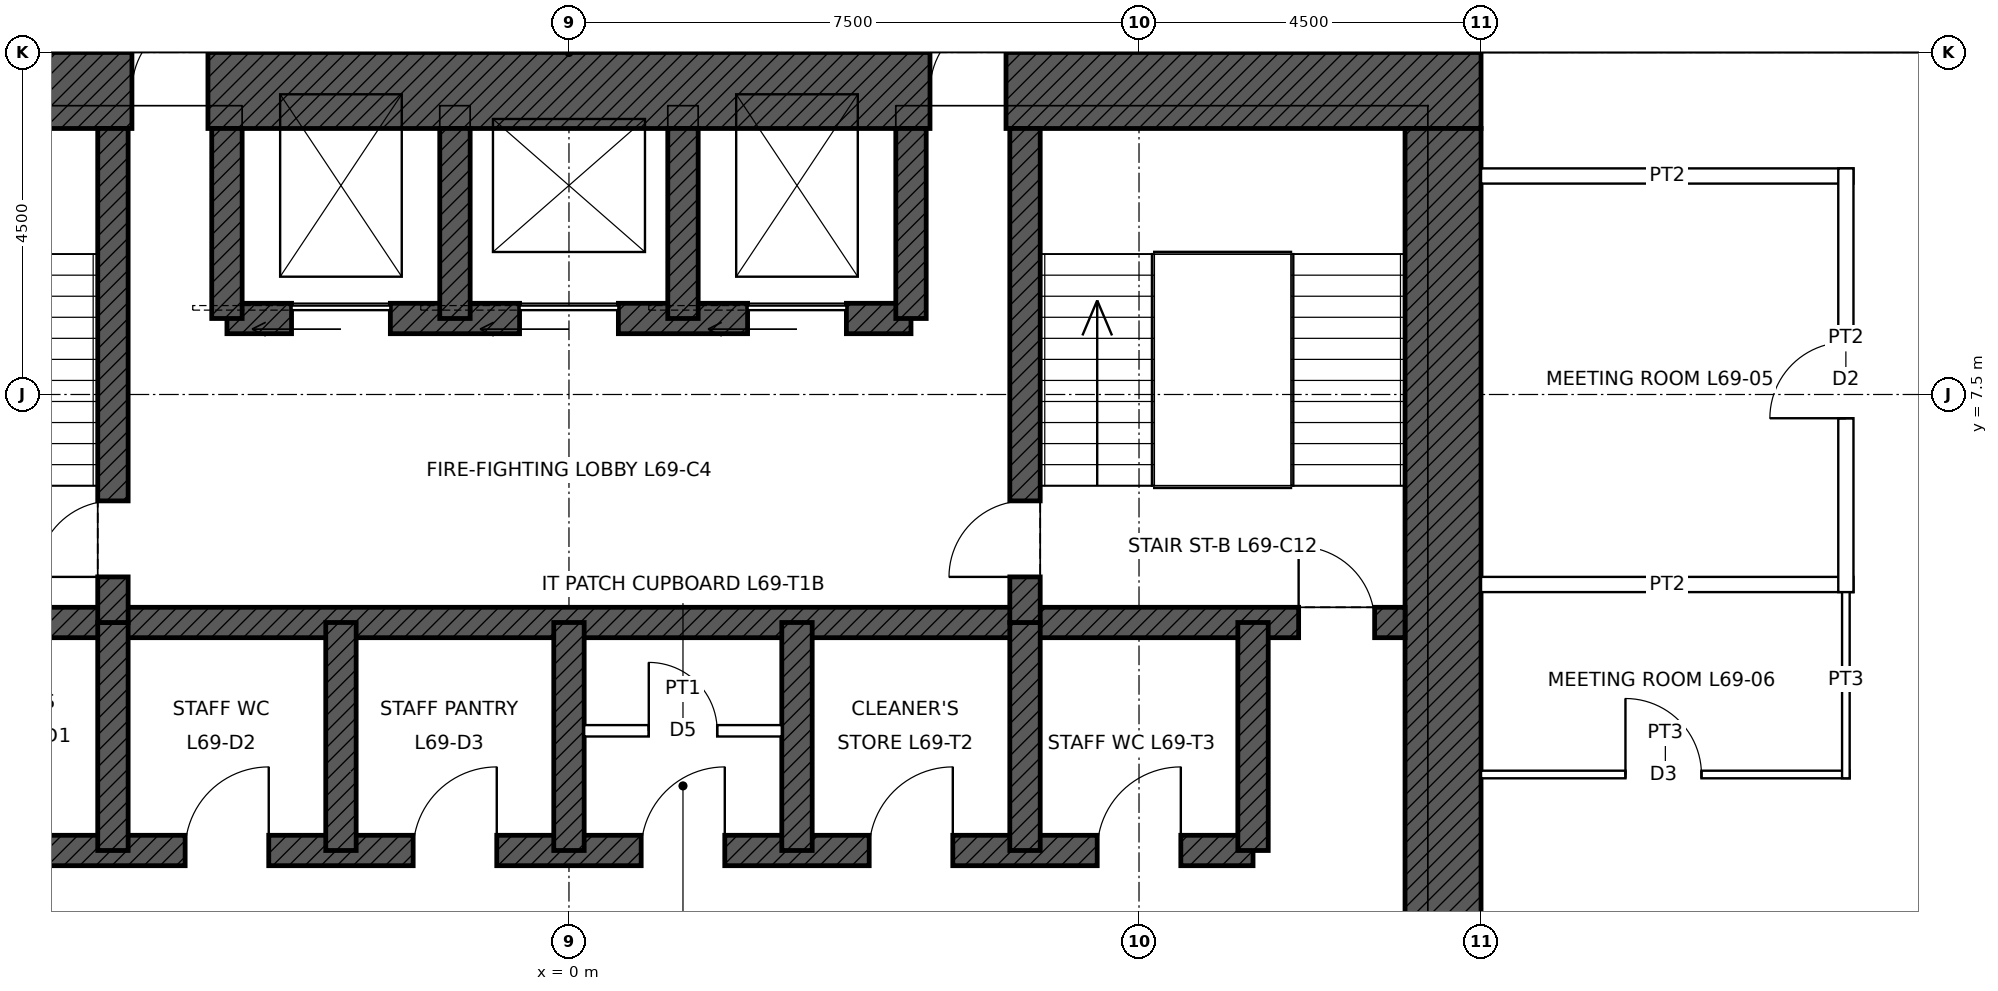
"""IFC4 building model, lengths in metres.
Left out: names, types, materials, properties, quantities, classifications, styles, units other than length and angle.
Written with IfcOpenShell. Run it as: python <this file> out.ifc"""

import sys

from ifc_helpers import new_model, si_unit, direction, frame, frame_2d, origin, place, context, subcontext, project, spatial, rectangle, extrude, element, fill, save


model = new_model("IFC4")
c1 = context("Model", 3, precision=1e-05, world=origin(), true_north=direction((0.0, 1.0)))
c2 = subcontext(c1, "Body", "Model", "MODEL_VIEW")
j1 = project(units=[si_unit("LENGTHUNIT", "METRE"), si_unit("PLANEANGLEUNIT", "RADIAN")], contexts=[c1])
p1 = place(None, origin())
s1 = spatial("IfcSite", under=j1, at=p1, CompositionType="ELEMENT")
p2 = place(p1, origin())
s2 = spatial("IfcBuilding", under=s1, at=p2, CompositionType="ELEMENT")
p3 = place(p2, frame((0.0, 0.0, 311.9)))
s3 = spatial("IfcBuildingStorey", under=s2, at=p3, CompositionType="ELEMENT", Elevation=311.9)
p4 = place(p3, frame((-12.0, 11.5, 0.0), z_axis=(0.0, 0.0, 1.0), x_axis=(1.0, 0.0, 0.0)))
e1 = element("IfcWall", 1, at=p4, inside=s3, PredefinedType="SHEAR", context=c2, shape_type="SweptSolid", body=[
    extrude(rectangle(XDim=24.0, YDim=1.0, at=frame_2d((12.0, 0.0))), origin(), (0.0, 0.0, 1.0), 4.0),
])
p5 = place(p4, frame((6.25, 0.0, 0.0)))
e2 = element("IfcOpeningElement", 2, at=p5, cuts=e1, PredefinedType="OPENING", context=c2, shape_type="SweptSolid", body=[
    extrude(rectangle(XDim=1.0, YDim=2.4, at=frame_2d((0.5, 1.2))), frame((0.0, 0.51, 0.0), z_axis=(0.0, -1.0, 0.0), x_axis=(1.0, 0.0, 0.0)), (0.0, 0.0, 1.0), 1.02),
])
p6 = place(p4, frame((16.75, 0.0, 0.0)))
e3 = element("IfcOpeningElement", 3, at=p6, cuts=e1, PredefinedType="OPENING", context=c2, shape_type="SweptSolid", body=[
    extrude(rectangle(XDim=1.0, YDim=2.4, at=frame_2d((0.5, 1.2))), frame((0.0, 0.51, 0.0), z_axis=(0.0, -1.0, 0.0), x_axis=(1.0, 0.0, 0.0)), (0.0, 0.0, 1.0), 1.02),
])
p7 = place(p3, frame((11.5, 11.0, 0.0), z_axis=(0.0, 0.0, 1.0), x_axis=(0.0, -1.0, 0.0)))
e4 = element("IfcWall", 4, at=p7, inside=s3, PredefinedType="SHEAR", context=c2, shape_type="SweptSolid", body=[
    extrude(rectangle(XDim=22.0, YDim=1.0, at=frame_2d((11.0, 0.0))), origin(), (0.0, 0.0, 1.0), 4.0),
])
p8 = place(p7, frame((10.5, 0.0, 0.0)))
e5 = element("IfcOpeningElement", 5, at=p8, cuts=e4, PredefinedType="OPENING", context=c2, shape_type="SweptSolid", body=[
    extrude(rectangle(XDim=1.0, YDim=2.4, at=frame_2d((0.5, 1.2))), frame((0.0, 0.51, 0.0), z_axis=(0.0, -1.0, 0.0), x_axis=(1.0, 0.0, 0.0)), (0.0, 0.0, 1.0), 1.02),
])
p9 = place(p3, frame((-11.0, 4.5, 0.0), z_axis=(0.0, 0.0, 1.0), x_axis=(1.0, 0.0, 0.0)))
e6 = element("IfcWall", 6, at=p9, inside=s3, PredefinedType="SHEAR", context=c2, shape_type="SweptSolid", body=[
    extrude(rectangle(XDim=22.0, YDim=0.4, at=frame_2d((11.0, 0.0))), origin(), (0.0, 0.0, 1.0), 4.0),
])
p10 = place(p9, frame((0.4, 0.0, 0.0)))
e7 = element("IfcOpeningElement", 7, at=p10, cuts=e6, PredefinedType="OPENING", context=c2, shape_type="SweptSolid", body=[
    extrude(rectangle(XDim=1.0, YDim=2.1, at=frame_2d((0.5, 1.05))), frame((0.0, 0.21, 0.0), z_axis=(0.0, -1.0, 0.0), x_axis=(1.0, 0.0, 0.0)), (0.0, 0.0, 1.0), 0.42),
])
p11 = place(p9, frame((20.6, 0.0, 0.0)))
e8 = element("IfcOpeningElement", 8, at=p11, cuts=e6, PredefinedType="OPENING", context=c2, shape_type="SweptSolid", body=[
    extrude(rectangle(XDim=1.0, YDim=2.1, at=frame_2d((0.5, 1.05))), frame((0.0, 0.21, 0.0), z_axis=(0.0, -1.0, 0.0), x_axis=(1.0, 0.0, 0.0)), (0.0, 0.0, 1.0), 0.42),
])
p12 = place(p3, frame((-9.0, 1.5, 0.0), z_axis=(0.0, 0.0, 1.0), x_axis=(1.0, 0.0, 0.0)))
e9 = element("IfcWall", 9, at=p12, inside=s3, PredefinedType="SHEAR", context=c2, shape_type="SweptSolid", body=[
    extrude(rectangle(XDim=18.0, YDim=0.4, at=frame_2d((9.0, 0.0))), origin(), (0.0, 0.0, 1.0), 4.0),
])
p13 = place(p12, frame((0.95, 0.0, 0.0)))
e10 = element("IfcOpeningElement", 10, at=p13, cuts=e9, PredefinedType="OPENING", context=c2, shape_type="SweptSolid", body=[
    extrude(rectangle(XDim=1.1, YDim=2.1, at=frame_2d((0.55, 1.05))), frame((0.0, 0.21, 0.0), z_axis=(0.0, -1.0, 0.0), x_axis=(1.0, 0.0, 0.0)), (0.0, 0.0, 1.0), 0.42),
])
p14 = place(p12, frame((3.95, 0.0, 0.0)))
e11 = element("IfcOpeningElement", 11, at=p14, cuts=e9, PredefinedType="OPENING", context=c2, shape_type="SweptSolid", body=[
    extrude(rectangle(XDim=1.1, YDim=2.1, at=frame_2d((0.55, 1.05))), frame((0.0, 0.21, 0.0), z_axis=(0.0, -1.0, 0.0), x_axis=(1.0, 0.0, 0.0)), (0.0, 0.0, 1.0), 0.42),
])
p15 = place(p12, frame((6.95, 0.0, 0.0)))
e12 = element("IfcOpeningElement", 12, at=p15, cuts=e9, PredefinedType="OPENING", context=c2, shape_type="SweptSolid", body=[
    extrude(rectangle(XDim=1.1, YDim=2.1, at=frame_2d((0.55, 1.05))), frame((0.0, 0.21, 0.0), z_axis=(0.0, -1.0, 0.0), x_axis=(1.0, 0.0, 0.0)), (0.0, 0.0, 1.0), 0.42),
])
p16 = place(p12, frame((9.95, 0.0, 0.0)))
e13 = element("IfcOpeningElement", 13, at=p16, cuts=e9, PredefinedType="OPENING", context=c2, shape_type="SweptSolid", body=[
    extrude(rectangle(XDim=1.1, YDim=2.1, at=frame_2d((0.55, 1.05))), frame((0.0, 0.21, 0.0), z_axis=(0.0, -1.0, 0.0), x_axis=(1.0, 0.0, 0.0)), (0.0, 0.0, 1.0), 0.42),
])
p17 = place(p12, frame((12.95, 0.0, 0.0)))
e14 = element("IfcOpeningElement", 14, at=p17, cuts=e9, PredefinedType="OPENING", context=c2, shape_type="SweptSolid", body=[
    extrude(rectangle(XDim=1.1, YDim=2.1, at=frame_2d((0.55, 1.05))), frame((0.0, 0.21, 0.0), z_axis=(0.0, -1.0, 0.0), x_axis=(1.0, 0.0, 0.0)), (0.0, 0.0, 1.0), 0.42),
])
p18 = place(p12, frame((15.95, 0.0, 0.0)))
e15 = element("IfcOpeningElement", 15, at=p18, cuts=e9, PredefinedType="OPENING", context=c2, shape_type="SweptSolid", body=[
    extrude(rectangle(XDim=1.1, YDim=2.1, at=frame_2d((0.55, 1.05))), frame((0.0, 0.21, 0.0), z_axis=(0.0, -1.0, 0.0), x_axis=(1.0, 0.0, 0.0)), (0.0, 0.0, 1.0), 0.42),
])
p19 = place(p3, frame((-4.5, 8.5, 0.0), z_axis=(0.0, 0.0, 1.0), x_axis=(1.0, 0.0, 0.0)))
e16 = element("IfcWall", 16, at=p19, inside=s3, PredefinedType="SHEAR", context=c2, shape_type="SweptSolid", body=[
    extrude(rectangle(XDim=9.0, YDim=0.4, at=frame_2d((4.5, 0.0))), origin(), (0.0, 0.0, 1.0), 4.0),
])
p20 = place(p19, frame((0.85, 0.0, 0.0)))
e17 = element("IfcOpeningElement", 17, at=p20, cuts=e16, PredefinedType="OPENING", context=c2, shape_type="SweptSolid", body=[
    extrude(rectangle(XDim=1.3, YDim=2.4, at=frame_2d((0.65, 1.2))), frame((0.0, 0.21, 0.0), z_axis=(0.0, -1.0, 0.0), x_axis=(1.0, 0.0, 0.0)), (0.0, 0.0, 1.0), 0.42),
])
p21 = place(p19, frame((6.85, 0.0, 0.0)))
e18 = element("IfcOpeningElement", 18, at=p21, cuts=e16, PredefinedType="OPENING", context=c2, shape_type="SweptSolid", body=[
    extrude(rectangle(XDim=1.3, YDim=2.4, at=frame_2d((0.65, 1.2))), frame((0.0, 0.21, 0.0), z_axis=(0.0, -1.0, 0.0), x_axis=(1.0, 0.0, 0.0)), (0.0, 0.0, 1.0), 0.42),
])
p22 = place(p19, frame((3.85, 0.0, 0.0)))
e19 = element("IfcOpeningElement", 19, at=p22, cuts=e16, PredefinedType="OPENING", context=c2, shape_type="SweptSolid", body=[
    extrude(rectangle(XDim=1.3, YDim=2.4, at=frame_2d((0.65, 1.2))), frame((0.0, 0.21, 0.0), z_axis=(0.0, -1.0, 0.0), x_axis=(1.0, 0.0, 0.0)), (0.0, 0.0, 1.0), 0.42),
])
for number, where, z_axis, x_axis in (
    (20, (9.0, 1.5, 0.0), (0.0, 0.0, 1.0), (0.0, 1.0, 0.0)),
    (21, (-6.0, 1.5, 0.0), (0.0, 0.0, 1.0), (0.0, 1.0, 0.0)),
    (22, (-3.0, 1.5, 0.0), (0.0, 0.0, 1.0), (0.0, 1.0, 0.0)),
    (23, (0.0, 1.5, 0.0), (0.0, 0.0, 1.0), (0.0, 1.0, 0.0)),
    (24, (3.0, 1.5, 0.0), (0.0, 0.0, 1.0), (0.0, 1.0, 0.0)),
    (25, (6.0, 1.5, 0.0), (0.0, 0.0, 1.0), (0.0, 1.0, 0.0)),
):
    element("IfcWall", number, at=place(p3, frame(where, z_axis=z_axis, x_axis=x_axis)), inside=s3, PredefinedType="SHEAR", context=c2, shape_type="SweptSolid", body=[
        extrude(rectangle(XDim=3.0, YDim=0.4, at=frame_2d((1.5, 0.0))), origin(), (0.0, 0.0, 1.0), 4.0),
    ])
p23 = place(p3, frame((-6.0, 4.5, 0.0), z_axis=(0.0, 0.0, 1.0), x_axis=(0.0, 1.0, 0.0)))
e26 = element("IfcWall", 26, at=p23, inside=s3, PredefinedType="SHEAR", context=c2, shape_type="SweptSolid", body=[
    extrude(rectangle(XDim=6.5, YDim=0.4, at=frame_2d((3.25, 0.0))), origin(), (0.0, 0.0, 1.0), 4.0),
])
p24 = place(p23, frame((0.6, 0.0, 0.0)))
e27 = element("IfcOpeningElement", 27, at=p24, cuts=e26, PredefinedType="OPENING", context=c2, shape_type="SweptSolid", body=[
    extrude(rectangle(XDim=1.0, YDim=2.1, at=frame_2d((0.5, 1.05))), frame((0.0, 0.21, 0.0), z_axis=(0.0, -1.0, 0.0), x_axis=(1.0, 0.0, 0.0)), (0.0, 0.0, 1.0), 0.42),
])
p25 = place(p3, frame((6.0, 4.5, 0.0), z_axis=(0.0, 0.0, 1.0), x_axis=(0.0, 1.0, 0.0)))
e28 = element("IfcWall", 28, at=p25, inside=s3, PredefinedType="SHEAR", context=c2, shape_type="SweptSolid", body=[
    extrude(rectangle(XDim=6.5, YDim=0.4, at=frame_2d((3.25, 0.0))), origin(), (0.0, 0.0, 1.0), 4.0),
])
p26 = place(p25, frame((0.6, 0.0, 0.0)))
e29 = element("IfcOpeningElement", 29, at=p26, cuts=e28, PredefinedType="OPENING", context=c2, shape_type="SweptSolid", body=[
    extrude(rectangle(XDim=1.0, YDim=2.1, at=frame_2d((0.5, 1.05))), frame((0.0, 0.21, 0.0), z_axis=(0.0, -1.0, 0.0), x_axis=(1.0, 0.0, 0.0)), (0.0, 0.0, 1.0), 0.42),
])
for number, where, z_axis, x_axis in (
    (30, (-4.5, 8.5, 0.0), (0.0, 0.0, 1.0), (0.0, 1.0, 0.0)),
    (31, (4.5, 8.5, 0.0), (0.0, 0.0, 1.0), (0.0, 1.0, 0.0)),
    (32, (-1.5, 8.5, 0.0), (0.0, 0.0, 1.0), (0.0, 1.0, 0.0)),
    (33, (1.5, 8.5, 0.0), (0.0, 0.0, 1.0), (0.0, 1.0, 0.0)),
):
    element("IfcWall", number, at=place(p3, frame(where, z_axis=z_axis, x_axis=x_axis)), inside=s3, PredefinedType="SHEAR", context=c2, shape_type="SweptSolid", body=[
        extrude(rectangle(XDim=2.5, YDim=0.4, at=frame_2d((1.25, 0.0))), origin(), (0.0, 0.0, 1.0), 4.0),
    ])
p27 = place(p3, frame((12.0, 2.5, 0.0), z_axis=(0.0, 0.0, 1.0), x_axis=(1.0, 0.0, 0.0)))
e34 = element("IfcWall", 34, at=p27, inside=s3, PredefinedType="PARTITIONING", context=c2, shape_type="SweptSolid", body=[
    extrude(rectangle(XDim=4.85, YDim=0.1, at=frame_2d((2.425, 0.0))), origin(), (0.0, 0.0, 1.0), 3.85),
])
p28 = place(p27, frame((1.9, 0.0, 0.0)))
e35 = element("IfcOpeningElement", 35, at=p28, cuts=e34, PredefinedType="OPENING", context=c2, shape_type="SweptSolid", body=[
    extrude(rectangle(XDim=1.0, YDim=2.1, at=frame_2d((0.5, 1.05))), frame((0.0, 0.06, 0.0), z_axis=(0.0, -1.0, 0.0), x_axis=(1.0, 0.0, 0.0)), (0.0, 0.0, 1.0), 0.12),
])
for number, where, z_axis, x_axis in (
    (36, (12.0, 5.0, 0.0), (0.0, 0.0, 1.0), (1.0, 0.0, 0.0)),
    (37, (12.0, 10.375, 0.0), (0.0, 0.0, 1.0), (1.0, 0.0, 0.0)),
):
    element("IfcWall", number, at=place(p3, frame(where, z_axis=z_axis, x_axis=x_axis)), inside=s3, PredefinedType="PARTITIONING", context=c2, shape_type="SweptSolid", body=[
        extrude(rectangle(XDim=4.9, YDim=0.2, at=frame_2d((2.45, 0.0))), origin(), (0.0, 0.0, 1.0), 3.85),
    ])
p29 = place(p3, frame((16.8, 2.45, 0.0), z_axis=(0.0, 0.0, 1.0), x_axis=(0.0, 1.0, 0.0)))
e38 = element("IfcWall", 38, at=p29, inside=s3, PredefinedType="PARTITIONING", context=c2, shape_type="SweptSolid", body=[
    extrude(rectangle(XDim=2.6, YDim=0.1, at=frame_2d((1.3, 0.0))), origin(), (0.0, 0.0, 1.0), 3.85),
])
p30 = place(p3, frame((16.8, 4.9, 0.0), z_axis=(0.0, 0.0, 1.0), x_axis=(0.0, 1.0, 0.0)))
e39 = element("IfcWall", 39, at=p30, inside=s3, PredefinedType="PARTITIONING", context=c2, shape_type="SweptSolid", body=[
    extrude(rectangle(XDim=5.575, YDim=0.2, at=frame_2d((2.788, 0.0))), origin(), (0.0, 0.0, 1.0), 3.85),
])
p31 = place(p30, frame((2.288, 0.0, 0.0)))
e40 = element("IfcOpeningElement", 40, at=p31, cuts=e39, PredefinedType="OPENING", context=c2, shape_type="SweptSolid", body=[
    extrude(rectangle(XDim=1.0, YDim=2.1, at=frame_2d((0.5, 1.05))), frame((0.0, 0.11, 0.0), z_axis=(0.0, -1.0, 0.0), x_axis=(1.0, 0.0, 0.0)), (0.0, 0.0, 1.0), 0.22),
])
p32 = place(p3, frame((0.2, 3.075, 0.0), z_axis=(0.0, 0.0, 1.0), x_axis=(1.0, 0.0, 0.0)))
e41 = element("IfcWall", 41, at=p32, inside=s3, PredefinedType="PARTITIONING", context=c2, shape_type="SweptSolid", body=[
    extrude(rectangle(XDim=2.6, YDim=0.15, at=frame_2d((1.3, 0.0))), origin(), (0.0, 0.0, 1.0), 3.75),
])
p33 = place(p32, frame((0.85, 0.0, 0.0)))
e42 = element("IfcOpeningElement", 42, at=p33, cuts=e41, PredefinedType="OPENING", context=c2, shape_type="SweptSolid", body=[
    extrude(rectangle(XDim=0.9, YDim=2.1, at=frame_2d((0.45, 1.05))), frame((0.0, 0.085, 0.0), z_axis=(0.0, -1.0, 0.0), x_axis=(1.0, 0.0, 0.0)), (0.0, 0.0, 1.0), 0.17),
])
p34 = place(p11, origin())
e43 = element("IfcDoor", 43, at=p34, inside=s3, OperationType="SINGLE_SWING_LEFT", PredefinedType="DOOR", context=c2, shape_type="SweptSolid", body=[
    extrude(rectangle(XDim=1.0, YDim=2.1, at=frame_2d((0.5, 1.05))), frame((0.0, 0.025, 0.0), z_axis=(0.0, -1.0, 0.0), x_axis=(1.0, 0.0, 0.0)), (0.0, 0.0, 1.0), 0.05),
])
fill(e8, e43)
p35 = place(p24, origin())
e44 = element("IfcDoor", 44, at=p35, inside=s3, OperationType="SINGLE_SWING_LEFT", PredefinedType="DOOR", context=c2, shape_type="SweptSolid", body=[
    extrude(rectangle(XDim=1.0, YDim=2.1, at=frame_2d((0.5, 1.05))), frame((0.0, 0.025, 0.0), z_axis=(0.0, -1.0, 0.0), x_axis=(1.0, 0.0, 0.0)), (0.0, 0.0, 1.0), 0.05),
])
fill(e27, e44)
p36 = place(p26, origin())
e45 = element("IfcDoor", 45, at=p36, inside=s3, OperationType="SINGLE_SWING_LEFT", PredefinedType="DOOR", context=c2, shape_type="SweptSolid", body=[
    extrude(rectangle(XDim=1.0, YDim=2.1, at=frame_2d((0.5, 1.05))), frame((0.0, 0.025, 0.0), z_axis=(0.0, -1.0, 0.0), x_axis=(1.0, 0.0, 0.0)), (0.0, 0.0, 1.0), 0.05),
])
fill(e29, e45)
p37 = place(p5, origin())
e46 = element("IfcDoor", 46, at=p37, inside=s3, OperationType="SINGLE_SWING_RIGHT", PredefinedType="DOOR", context=c2, shape_type="SweptSolid", body=[
    extrude(rectangle(XDim=1.0, YDim=2.4, at=frame_2d((0.5, 1.2))), frame((0.0, 0.485, 0.0), z_axis=(0.0, -1.0, 0.0), x_axis=(1.0, 0.0, 0.0)), (0.0, 0.0, 1.0), 0.05),
])
fill(e2, e46)
p38 = place(p6, origin())
e47 = element("IfcDoor", 47, at=p38, inside=s3, OperationType="SINGLE_SWING_RIGHT", PredefinedType="DOOR", context=c2, shape_type="SweptSolid", body=[
    extrude(rectangle(XDim=1.0, YDim=2.4, at=frame_2d((0.5, 1.2))), frame((0.0, 0.485, 0.0), z_axis=(0.0, -1.0, 0.0), x_axis=(1.0, 0.0, 0.0)), (0.0, 0.0, 1.0), 0.05),
])
fill(e3, e47)
p39 = place(p20, origin())
e48 = element("IfcDoor", 48, at=p39, inside=s3, OperationType="SLIDING_TO_LEFT", PredefinedType="DOOR", context=c2, shape_type="SweptSolid", body=[
    extrude(rectangle(XDim=1.3, YDim=2.4, at=frame_2d((0.65, 1.2))), frame((0.0, 0.025, 0.0), z_axis=(0.0, -1.0, 0.0), x_axis=(1.0, 0.0, 0.0)), (0.0, 0.0, 1.0), 0.05),
])
fill(e17, e48)
p40 = place(p21, origin())
e49 = element("IfcDoor", 49, at=p40, inside=s3, OperationType="SLIDING_TO_LEFT", PredefinedType="DOOR", context=c2, shape_type="SweptSolid", body=[
    extrude(rectangle(XDim=1.3, YDim=2.4, at=frame_2d((0.65, 1.2))), frame((0.0, 0.025, 0.0), z_axis=(0.0, -1.0, 0.0), x_axis=(1.0, 0.0, 0.0)), (0.0, 0.0, 1.0), 0.05),
])
fill(e18, e49)
p41 = place(p22, origin())
e50 = element("IfcDoor", 50, at=p41, inside=s3, OperationType="SLIDING_TO_LEFT", PredefinedType="DOOR", context=c2, shape_type="SweptSolid", body=[
    extrude(rectangle(XDim=1.3, YDim=2.4, at=frame_2d((0.65, 1.2))), frame((0.0, 0.025, 0.0), z_axis=(0.0, -1.0, 0.0), x_axis=(1.0, 0.0, 0.0)), (0.0, 0.0, 1.0), 0.05),
])
fill(e19, e50)
p42 = place(p14, origin())
e51 = element("IfcDoor", 51, at=p42, inside=s3, OperationType="SINGLE_SWING_RIGHT", PredefinedType="DOOR", context=c2, shape_type="SweptSolid", body=[
    extrude(rectangle(XDim=1.1, YDim=2.1, at=frame_2d((0.55, 1.05))), frame((0.0, 0.025, 0.0), z_axis=(0.0, -1.0, 0.0), x_axis=(1.0, 0.0, 0.0)), (0.0, 0.0, 1.0), 0.05),
])
fill(e11, e51)
p43 = place(p15, origin())
e52 = element("IfcDoor", 52, at=p43, inside=s3, OperationType="SINGLE_SWING_RIGHT", PredefinedType="DOOR", context=c2, shape_type="SweptSolid", body=[
    extrude(rectangle(XDim=1.1, YDim=2.1, at=frame_2d((0.55, 1.05))), frame((0.0, 0.025, 0.0), z_axis=(0.0, -1.0, 0.0), x_axis=(1.0, 0.0, 0.0)), (0.0, 0.0, 1.0), 0.05),
])
fill(e12, e52)
p44 = place(p16, origin())
e53 = element("IfcDoor", 53, at=p44, inside=s3, OperationType="SINGLE_SWING_RIGHT", PredefinedType="DOOR", context=c2, shape_type="SweptSolid", body=[
    extrude(rectangle(XDim=1.1, YDim=2.1, at=frame_2d((0.55, 1.05))), frame((0.0, 0.025, 0.0), z_axis=(0.0, -1.0, 0.0), x_axis=(1.0, 0.0, 0.0)), (0.0, 0.0, 1.0), 0.05),
])
fill(e13, e53)
p45 = place(p33, origin())
e54 = element("IfcDoor", 54, at=p45, inside=s3, OperationType="SINGLE_SWING_LEFT", PredefinedType="DOOR", context=c2, shape_type="SweptSolid", body=[
    extrude(rectangle(XDim=0.9, YDim=2.1, at=frame_2d((0.45, 1.05))), frame((0.0, 0.025, 0.0), z_axis=(0.0, -1.0, 0.0), x_axis=(1.0, 0.0, 0.0)), (0.0, 0.0, 1.0), 0.05),
])
fill(e42, e54)
p46 = place(p17, origin())
e55 = element("IfcDoor", 55, at=p46, inside=s3, OperationType="SINGLE_SWING_RIGHT", PredefinedType="DOOR", context=c2, shape_type="SweptSolid", body=[
    extrude(rectangle(XDim=1.1, YDim=2.1, at=frame_2d((0.55, 1.05))), frame((0.0, 0.025, 0.0), z_axis=(0.0, -1.0, 0.0), x_axis=(1.0, 0.0, 0.0)), (0.0, 0.0, 1.0), 0.05),
])
fill(e14, e55)
p47 = place(p18, origin())
e56 = element("IfcDoor", 56, at=p47, inside=s3, OperationType="SINGLE_SWING_RIGHT", PredefinedType="DOOR", context=c2, shape_type="SweptSolid", body=[
    extrude(rectangle(XDim=1.1, YDim=2.1, at=frame_2d((0.55, 1.05))), frame((0.0, 0.025, 0.0), z_axis=(0.0, -1.0, 0.0), x_axis=(1.0, 0.0, 0.0)), (0.0, 0.0, 1.0), 0.05),
])
fill(e15, e56)
p48 = place(p31, origin())
e57 = element("IfcDoor", 57, at=p48, inside=s3, OperationType="SINGLE_SWING_LEFT", PredefinedType="DOOR", context=c2, shape_type="SweptSolid", body=[
    extrude(rectangle(XDim=1.0, YDim=2.1, at=frame_2d((0.5, 1.05))), frame((0.0, 0.025, 0.0), z_axis=(0.0, -1.0, 0.0), x_axis=(1.0, 0.0, 0.0)), (0.0, 0.0, 1.0), 0.05),
])
fill(e40, e57)
p49 = place(p28, origin())
e58 = element("IfcDoor", 58, at=p49, inside=s3, OperationType="SINGLE_SWING_LEFT", PredefinedType="DOOR", context=c2, shape_type="SweptSolid", body=[
    extrude(rectangle(XDim=1.0, YDim=2.1, at=frame_2d((0.5, 1.05))), frame((0.0, 0.025, 0.0), z_axis=(0.0, -1.0, 0.0), x_axis=(1.0, 0.0, 0.0)), (0.0, 0.0, 1.0), 0.05),
])
fill(e35, e58)
save(model, sys.argv[1])
